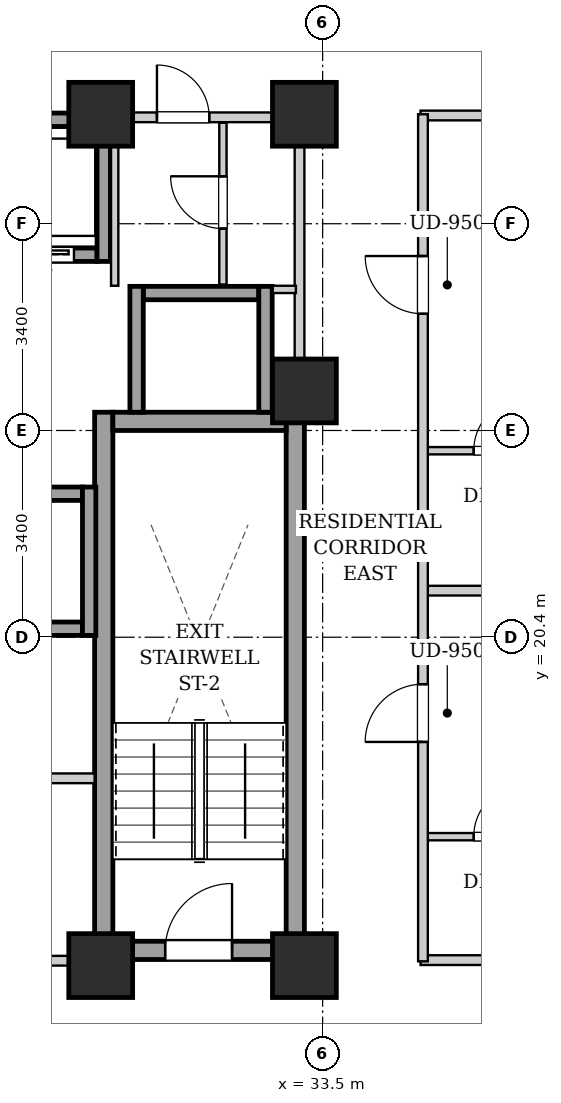
"""IFC4 building model, lengths in metres.
Left out: names, types, materials, properties, quantities, classifications, styles, units other than length and angle.
Written with IfcOpenShell. Run it as: python <this file> out.ifc"""

import sys

from ifc_helpers import new_model, si_unit, direction, frame, frame_2d, origin, origin_2d, place, context, subcontext, project, spatial, rectangle, extrude, element, fill, save


model = new_model("IFC4")
c1 = context("Model", 3, precision=1e-05, world=origin(), true_north=direction((0.0, 1.0)))
c2 = subcontext(c1, "Body", "Model", "MODEL_VIEW")
j1 = project(units=[si_unit("LENGTHUNIT", "METRE"), si_unit("PLANEANGLEUNIT", "RADIAN")], contexts=[c1])
p1 = place(None, origin())
s1 = spatial("IfcSite", under=j1, at=p1, CompositionType="ELEMENT")
p2 = place(p1, origin())
s2 = spatial("IfcBuilding", under=s1, at=p2, CompositionType="ELEMENT")
p3 = place(p2, frame((0.0, 0.0, 75.1)))
s3 = spatial("IfcBuildingStorey", under=s2, at=p3, CompositionType="ELEMENT", Elevation=75.1)
for number, where, z_axis, x_axis in (
    (1, (29.85, 15.0, 0.0), (0.0, 0.0, 1.0), (1.0, 0.0, 0.0)),
    (2, (33.2, 15.0, 0.0), (0.0, 0.0, 1.0), (1.0, 0.0, 0.0)),
    (3, (29.85, 29.0, 0.0), (0.0, 0.0, 1.0), (1.0, 0.0, 0.0)),
    (4, (33.2, 29.0, 0.0), (0.0, 0.0, 1.0), (1.0, 0.0, 0.0)),
    (5, (33.2, 24.45, 0.0), (0.0, 0.0, 1.0), (1.0, 0.0, 0.0)),
):
    element("IfcColumn", number, at=place(p3, frame(where, z_axis=z_axis, x_axis=x_axis)), inside=s3, PredefinedType="COLUMN", context=c2, shape_type="SweptSolid", body=[
        extrude(rectangle(XDim=1.05, YDim=1.05, at=origin_2d()), origin(), (0.0, 0.0, 1.0), 3.2),
    ])
for number, where, z_axis, x_axis in (
    (6, (29.9, 15.1, 0.0), (0.0, 0.0, 1.0), (0.0, 1.0, 0.0)),
    (7, (33.05, 15.1, 0.0), (0.0, 0.0, 1.0), (0.0, 1.0, 0.0)),
):
    element("IfcWall", number, at=place(p3, frame(where, z_axis=z_axis, x_axis=x_axis)), inside=s3, PredefinedType="SHEAR", context=c2, shape_type="SweptSolid", body=[
        extrude(rectangle(XDim=9.0, YDim=0.3, at=frame_2d((4.5, 0.0))), origin(), (0.0, 0.0, 1.0), 2.94),
    ])
p4 = place(p3, frame((30.05, 23.95, 0.0), z_axis=(0.0, 0.0, 1.0), x_axis=(1.0, 0.0, 0.0)))
e8 = element("IfcWall", 8, at=p4, inside=s3, PredefinedType="SHEAR", context=c2, shape_type="SweptSolid", body=[
    extrude(rectangle(XDim=2.85, YDim=0.3, at=frame_2d((1.425, 0.0))), origin(), (0.0, 0.0, 1.0), 2.94),
])
p5 = place(p3, frame((30.05, 15.25, 0.0), z_axis=(0.0, 0.0, 1.0), x_axis=(1.0, 0.0, 0.0)))
e9 = element("IfcWall", 9, at=p5, inside=s3, PredefinedType="SHEAR", context=c2, shape_type="SweptSolid", body=[
    extrude(rectangle(XDim=2.85, YDim=0.3, at=frame_2d((1.425, 0.0))), origin(), (0.0, 0.0, 1.0), 2.94),
])
p6 = place(p5, frame((0.86, 0.0, 0.0)))
e10 = element("IfcOpeningElement", 10, at=p6, cuts=e9, PredefinedType="OPENING", context=c2, shape_type="SweptSolid", body=[
    extrude(rectangle(XDim=1.1, YDim=2.05, at=frame_2d((0.55, 1.025))), frame((0.0, 0.16, 0.0), z_axis=(0.0, -1.0, 0.0), x_axis=(1.0, 0.0, 0.0)), (0.0, 0.0, 1.0), 0.32),
])
p7 = place(p3, frame((27.93, 26.69, 0.0), z_axis=(0.0, 0.0, 1.0), x_axis=(1.0, 0.0, 0.0)))
e11 = element("IfcWall", 11, at=p7, inside=s3, PredefinedType="SHEAR", context=c2, shape_type="SweptSolid", body=[
    extrude(rectangle(XDim=1.86, YDim=0.22, at=frame_2d((0.93, 0.0))), origin(), (0.0, 0.0, 1.0), 2.94),
])
p8 = place(p7, frame((0.38, 0.0, 0.0)))
e12 = element("IfcOpeningElement", 12, at=p8, cuts=e11, PredefinedType="OPENING", context=c2, shape_type="SweptSolid", body=[
    extrude(rectangle(XDim=1.1, YDim=2.15, at=frame_2d((0.55, 1.075))), frame((0.0, 0.12, 0.0), z_axis=(0.0, -1.0, 0.0), x_axis=(1.0, 0.0, 0.0)), (0.0, 0.0, 1.0), 0.24),
])
p9 = place(p3, frame((27.93, 28.91, 0.0), z_axis=(0.0, 0.0, 1.0), x_axis=(1.0, 0.0, 0.0)))
e13 = element("IfcWall", 13, at=p9, inside=s3, PredefinedType="SHEAR", context=c2, shape_type="SweptSolid", body=[
    extrude(rectangle(XDim=1.86, YDim=0.22, at=frame_2d((0.93, 0.0))), origin(), (0.0, 0.0, 1.0), 2.94),
])
p10 = place(p3, frame((29.9, 26.58, 0.0), z_axis=(0.0, 0.0, 1.0), x_axis=(0.0, 1.0, 0.0)))
e14 = element("IfcWall", 14, at=p10, inside=s3, PredefinedType="SHEAR", context=c2, shape_type="SweptSolid", body=[
    extrude(rectangle(XDim=2.44, YDim=0.22, at=frame_2d((1.22, 0.0))), origin(), (0.0, 0.0, 1.0), 2.94),
])
for number, where, z_axis, x_axis in (
    (15, (27.65, 20.54, 0.0), (0.0, 0.0, 1.0), (1.0, 0.0, 0.0)),
    (16, (27.65, 22.76, 0.0), (0.0, 0.0, 1.0), (1.0, 0.0, 0.0)),
):
    element("IfcWall", number, at=place(p3, frame(where, z_axis=z_axis, x_axis=x_axis)), inside=s3, PredefinedType="SHEAR", context=c2, shape_type="SweptSolid", body=[
        extrude(rectangle(XDim=1.9, YDim=0.22, at=frame_2d((0.95, 0.0))), origin(), (0.0, 0.0, 1.0), 2.94),
    ])
p11 = place(p3, frame((29.66, 20.43, 0.0), z_axis=(0.0, 0.0, 1.0), x_axis=(0.0, 1.0, 0.0)))
e17 = element("IfcWall", 17, at=p11, inside=s3, PredefinedType="SHEAR", context=c2, shape_type="SweptSolid", body=[
    extrude(rectangle(XDim=2.44, YDim=0.22, at=frame_2d((1.22, 0.0))), origin(), (0.0, 0.0, 1.0), 2.94),
])
p12 = place(p3, frame((30.55, 26.06, 0.0), z_axis=(0.0, 0.0, 1.0), x_axis=(1.0, 0.0, 0.0)))
e18 = element("IfcWall", 18, at=p12, inside=s3, PredefinedType="SHEAR", context=c2, shape_type="SweptSolid", body=[
    extrude(rectangle(XDim=1.9, YDim=0.22, at=frame_2d((0.95, 0.0))), origin(), (0.0, 0.0, 1.0), 2.94),
])
for number, where, z_axis, x_axis in (
    (19, (30.44, 24.1, 0.0), (0.0, 0.0, 1.0), (0.0, 1.0, 0.0)),
    (20, (32.56, 24.1, 0.0), (0.0, 0.0, 1.0), (0.0, 1.0, 0.0)),
):
    element("IfcWall", number, at=place(p3, frame(where, z_axis=z_axis, x_axis=x_axis)), inside=s3, PredefinedType="SHEAR", context=c2, shape_type="SweptSolid", body=[
        extrude(rectangle(XDim=2.07, YDim=0.22, at=frame_2d((1.035, 0.0))), origin(), (0.0, 0.0, 1.0), 2.94),
    ])
p13 = place(p3, frame((21.25, 15.08, 0.0), z_axis=(0.0, 0.0, 1.0), x_axis=(1.0, 0.0, 0.0)))
e21 = element("IfcWall", 21, at=p13, inside=s3, PredefinedType="PARTITIONING", context=c2, shape_type="SweptSolid", body=[
    extrude(rectangle(XDim=8.5, YDim=0.16, at=frame_2d((4.25, 0.0))), origin(), (0.0, 0.0, 1.0), 2.309),
])
p14 = place(p13, frame((3.725, 0.0, 0.0)))
e22 = element("IfcOpeningElement", 22, at=p14, cuts=e21, PredefinedType="OPENING", context=c2, shape_type="SweptSolid", body=[
    extrude(rectangle(XDim=1.05, YDim=2.05, at=frame_2d((0.525, 1.025))), frame((0.0, 0.09, 0.0), z_axis=(0.0, -1.0, 0.0), x_axis=(1.0, 0.0, 0.0)), (0.0, 0.0, 1.0), 0.18),
])
p15 = place(p3, frame((28.65, 18.08, 0.0), z_axis=(0.0, 0.0, 1.0), x_axis=(1.0, 0.0, 0.0)))
e23 = element("IfcWall", 23, at=p15, inside=s3, PredefinedType="PARTITIONING", context=c2, shape_type="SweptSolid", body=[
    extrude(rectangle(XDim=1.1, YDim=0.16, at=frame_2d((0.55, 0.0))), origin(), (0.0, 0.0, 1.0), 2.94),
])
p16 = place(p3, frame((33.12, 24.12, 0.0), z_axis=(0.0, 0.0, 1.0), x_axis=(0.0, 1.0, 0.0)))
e24 = element("IfcWall", 24, at=p16, inside=s3, PredefinedType="PARTITIONING", context=c2, shape_type="SweptSolid", body=[
    extrude(rectangle(XDim=4.76, YDim=0.16, at=frame_2d((2.38, 0.0))), origin(), (0.0, 0.0, 1.0), 2.94),
])
p17 = place(p3, frame((30.08, 26.18, 0.0), z_axis=(0.0, 0.0, 1.0), x_axis=(0.0, 1.0, 0.0)))
e25 = element("IfcWall", 25, at=p17, inside=s3, PredefinedType="PARTITIONING", context=c2, shape_type="SweptSolid", body=[
    extrude(rectangle(XDim=2.68, YDim=0.12, at=frame_2d((1.34, 0.0))), origin(), (0.0, 0.0, 1.0), 2.94),
])
p18 = place(p3, frame((32.68, 26.12, 0.0), z_axis=(0.0, 0.0, 1.0), x_axis=(1.0, 0.0, 0.0)))
e26 = element("IfcWall", 26, at=p18, inside=s3, PredefinedType="PARTITIONING", context=c2, shape_type="SweptSolid", body=[
    extrude(rectangle(XDim=0.38, YDim=0.12, at=frame_2d((0.19, 0.0))), origin(), (0.0, 0.0, 1.0), 2.94),
])
p19 = place(p3, frame((31.86, 26.2, 0.0), z_axis=(0.0, 0.0, 1.0), x_axis=(0.0, 1.0, 0.0)))
e27 = element("IfcWall", 27, at=p19, inside=s3, PredefinedType="PARTITIONING", context=c2, shape_type="SweptSolid", body=[
    extrude(rectangle(XDim=2.66, YDim=0.12, at=frame_2d((1.33, 0.0))), origin(), (0.0, 0.0, 1.0), 2.94),
])
p20 = place(p19, frame((0.92, 0.0, 0.0)))
e28 = element("IfcOpeningElement", 28, at=p20, cuts=e27, PredefinedType="OPENING", context=c2, shape_type="SweptSolid", body=[
    extrude(rectangle(XDim=0.86, YDim=2.05, at=frame_2d((0.43, 1.025))), frame((0.0, 0.07, 0.0), z_axis=(0.0, -1.0, 0.0), x_axis=(1.0, 0.0, 0.0)), (0.0, 0.0, 1.0), 0.14),
])
p21 = place(p3, frame((30.08, 28.95, 0.0), z_axis=(0.0, 0.0, 1.0), x_axis=(1.0, 0.0, 0.0)))
e29 = element("IfcWall", 29, at=p21, inside=s3, PredefinedType="PARTITIONING", context=c2, shape_type="SweptSolid", body=[
    extrude(rectangle(XDim=2.96, YDim=0.16, at=frame_2d((1.48, 0.0))), origin(), (0.0, 0.0, 1.0), 2.94),
])
p22 = place(p21, frame((0.695, 0.0, 0.0)))
e30 = element("IfcOpeningElement", 30, at=p22, cuts=e29, PredefinedType="OPENING", context=c2, shape_type="SweptSolid", body=[
    extrude(rectangle(XDim=0.86, YDim=2.05, at=frame_2d((0.43, 1.025))), frame((0.0, 0.09, 0.0), z_axis=(0.0, -1.0, 0.0), x_axis=(1.0, 0.0, 0.0)), (0.0, 0.0, 1.0), 0.18),
])
for number, where, z_axis, x_axis in (
    (31, (35.11, 15.09, 0.0), (0.0, 0.0, 1.0), (1.0, 0.0, 0.0)),
    (32, (35.11, 28.98, 0.0), (0.0, 0.0, 1.0), (1.0, 0.0, 0.0)),
):
    element("IfcWall", number, at=place(p3, frame(where, z_axis=z_axis, x_axis=x_axis)), inside=s3, PredefinedType="PARTITIONING", context=c2, shape_type="SweptSolid", body=[
        extrude(rectangle(XDim=8.01, YDim=0.16, at=frame_2d((4.005, 0.0))), origin(), (0.0, 0.0, 1.0), 2.309),
    ])
p23 = place(p3, frame((35.19, 21.166, 0.0), z_axis=(0.0, 0.0, 1.0), x_axis=(1.0, 0.0, 0.0)))
e33 = element("IfcWall", 33, at=p23, inside=s3, PredefinedType="PARTITIONING", context=c2, shape_type="SweptSolid", body=[
    extrude(rectangle(XDim=7.93, YDim=0.16, at=frame_2d((3.965, 0.0))), origin(), (0.0, 0.0, 1.0), 2.94),
])
p24 = place(p3, frame((35.19, 17.12, 0.0), z_axis=(0.0, 0.0, 1.0), x_axis=(1.0, 0.0, 0.0)))
e34 = element("IfcWall", 34, at=p24, inside=s3, PredefinedType="PARTITIONING", context=c2, shape_type="SweptSolid", body=[
    extrude(rectangle(XDim=2.45, YDim=0.12, at=frame_2d((1.225, 0.0))), origin(), (0.0, 0.0, 1.0), 2.94),
])
p25 = place(p24, frame((0.795, 0.0, 0.0)))
e35 = element("IfcOpeningElement", 35, at=p25, cuts=e34, PredefinedType="OPENING", context=c2, shape_type="SweptSolid", body=[
    extrude(rectangle(XDim=0.86, YDim=2.05, at=frame_2d((0.43, 1.025))), frame((0.0, 0.07, 0.0), z_axis=(0.0, -1.0, 0.0), x_axis=(1.0, 0.0, 0.0)), (0.0, 0.0, 1.0), 0.14),
])
p26 = place(p3, frame((35.19, 23.467, 0.0), z_axis=(0.0, 0.0, 1.0), x_axis=(1.0, 0.0, 0.0)))
e36 = element("IfcWall", 36, at=p26, inside=s3, PredefinedType="PARTITIONING", context=c2, shape_type="SweptSolid", body=[
    extrude(rectangle(XDim=2.45, YDim=0.12, at=frame_2d((1.225, 0.0))), origin(), (0.0, 0.0, 1.0), 2.94),
])
p27 = place(p26, frame((0.795, 0.0, 0.0)))
e37 = element("IfcOpeningElement", 37, at=p27, cuts=e36, PredefinedType="OPENING", context=c2, shape_type="SweptSolid", body=[
    extrude(rectangle(XDim=0.86, YDim=2.05, at=frame_2d((0.43, 1.025))), frame((0.0, 0.07, 0.0), z_axis=(0.0, -1.0, 0.0), x_axis=(1.0, 0.0, 0.0)), (0.0, 0.0, 1.0), 0.14),
])
p28 = place(p3, frame((35.15, 15.07, 0.0), z_axis=(0.0, 0.0, 1.0), x_axis=(0.0, 1.0, 0.0)))
e38 = element("IfcWall", 38, at=p28, inside=s3, PredefinedType="PARTITIONING", context=c2, shape_type="SweptSolid", body=[
    extrude(rectangle(XDim=13.93, YDim=0.16, at=frame_2d((6.965, 0.0))), origin(), (0.0, 0.0, 1.0), 2.94),
])
p29 = place(p28, frame((3.608, 0.0, 0.0)))
e39 = element("IfcOpeningElement", 39, at=p29, cuts=e38, PredefinedType="OPENING", context=c2, shape_type="SweptSolid", body=[
    extrude(rectangle(XDim=0.95, YDim=2.1, at=frame_2d((0.475, 1.05))), frame((0.0, 0.09, 0.0), z_axis=(0.0, -1.0, 0.0), x_axis=(1.0, 0.0, 0.0)), (0.0, 0.0, 1.0), 0.18),
])
p30 = place(p28, frame((10.649, 0.0, 0.0)))
e40 = element("IfcOpeningElement", 40, at=p30, cuts=e38, PredefinedType="OPENING", context=c2, shape_type="SweptSolid", body=[
    extrude(rectangle(XDim=0.95, YDim=2.1, at=frame_2d((0.475, 1.05))), frame((0.0, 0.09, 0.0), z_axis=(0.0, -1.0, 0.0), x_axis=(1.0, 0.0, 0.0)), (0.0, 0.0, 1.0), 0.18),
])
p31 = place(p6, origin())
e41 = element("IfcDoor", 41, at=p31, inside=s3, OperationType="SINGLE_SWING_RIGHT", PredefinedType="DOOR", context=c2, shape_type="SweptSolid", body=[
    extrude(rectangle(XDim=1.1, YDim=2.05, at=frame_2d((0.55, 1.025))), frame((0.0, 0.025, 0.0), z_axis=(0.0, -1.0, 0.0), x_axis=(1.0, 0.0, 0.0)), (0.0, 0.0, 1.0), 0.05),
])
fill(e10, e41)
p32 = place(p8, origin())
e42 = element("IfcDoor", 42, at=p32, inside=s3, OperationType="SLIDING_TO_LEFT", PredefinedType="DOOR", context=c2, shape_type="SweptSolid", body=[
    extrude(rectangle(XDim=1.1, YDim=2.15, at=frame_2d((0.55, 1.075))), frame((0.0, 0.025, 0.0), z_axis=(0.0, -1.0, 0.0), x_axis=(1.0, 0.0, 0.0)), (0.0, 0.0, 1.0), 0.05),
])
fill(e12, e42)
p33 = place(p20, origin())
e43 = element("IfcDoor", 43, at=p33, inside=s3, OperationType="SINGLE_SWING_RIGHT", PredefinedType="DOOR", context=c2, shape_type="SweptSolid", body=[
    extrude(rectangle(XDim=0.86, YDim=2.05, at=frame_2d((0.43, 1.025))), frame((0.0, 0.025, 0.0), z_axis=(0.0, -1.0, 0.0), x_axis=(1.0, 0.0, 0.0)), (0.0, 0.0, 1.0), 0.05),
])
fill(e28, e43)
p34 = place(p22, origin())
e44 = element("IfcDoor", 44, at=p34, inside=s3, OperationType="SINGLE_SWING_LEFT", PredefinedType="DOOR", context=c2, shape_type="SweptSolid", body=[
    extrude(rectangle(XDim=0.86, YDim=2.05, at=frame_2d((0.43, 1.025))), frame((0.0, 0.025, 0.0), z_axis=(0.0, -1.0, 0.0), x_axis=(1.0, 0.0, 0.0)), (0.0, 0.0, 1.0), 0.05),
])
fill(e30, e44)
p35 = place(p25, origin())
e45 = element("IfcDoor", 45, at=p35, inside=s3, OperationType="SINGLE_SWING_RIGHT", PredefinedType="DOOR", context=c2, shape_type="SweptSolid", body=[
    extrude(rectangle(XDim=0.86, YDim=2.05, at=frame_2d((0.43, 1.025))), frame((0.0, 0.025, 0.0), z_axis=(0.0, -1.0, 0.0), x_axis=(1.0, 0.0, 0.0)), (0.0, 0.0, 1.0), 0.05),
])
fill(e35, e45)
p36 = place(p27, origin())
e46 = element("IfcDoor", 46, at=p36, inside=s3, OperationType="SINGLE_SWING_RIGHT", PredefinedType="DOOR", context=c2, shape_type="SweptSolid", body=[
    extrude(rectangle(XDim=0.86, YDim=2.05, at=frame_2d((0.43, 1.025))), frame((0.0, 0.025, 0.0), z_axis=(0.0, -1.0, 0.0), x_axis=(1.0, 0.0, 0.0)), (0.0, 0.0, 1.0), 0.05),
])
fill(e37, e46)
p37 = place(p29, origin())
e47 = element("IfcDoor", 47, at=p37, inside=s3, OperationType="SINGLE_SWING_LEFT", PredefinedType="DOOR", context=c2, shape_type="SweptSolid", body=[
    extrude(rectangle(XDim=0.95, YDim=2.1, at=frame_2d((0.475, 1.05))), frame((0.0, 0.025, 0.0), z_axis=(0.0, -1.0, 0.0), x_axis=(1.0, 0.0, 0.0)), (0.0, 0.0, 1.0), 0.05),
])
fill(e39, e47)
p38 = place(p30, origin())
e48 = element("IfcDoor", 48, at=p38, inside=s3, OperationType="SINGLE_SWING_RIGHT", PredefinedType="DOOR", context=c2, shape_type="SweptSolid", body=[
    extrude(rectangle(XDim=0.95, YDim=2.1, at=frame_2d((0.475, 1.05))), frame((0.0, 0.025, 0.0), z_axis=(0.0, -1.0, 0.0), x_axis=(1.0, 0.0, 0.0)), (0.0, 0.0, 1.0), 0.05),
])
fill(e40, e48)
save(model, sys.argv[1])
